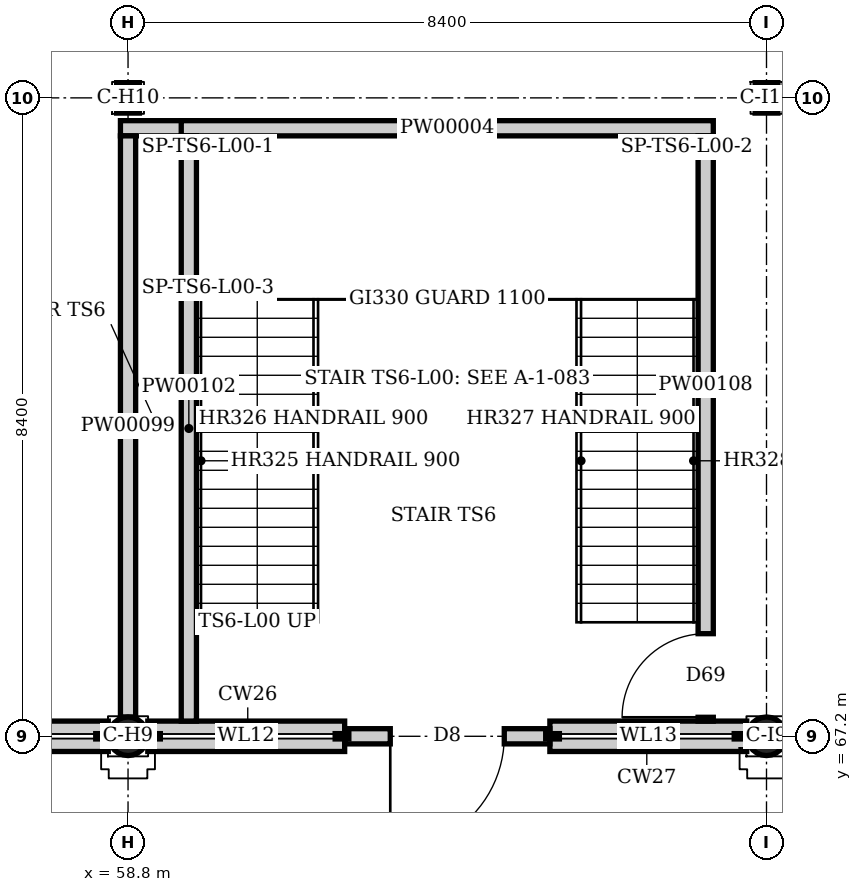
"""IFC4 building model, lengths in metres.
Left out: names, types, materials, properties, quantities, classifications, styles, units other than length and angle.
Written with IfcOpenShell. Run it as: python <this file> out.ifc"""

import sys

from ifc_helpers import new_model, si_unit, direction, frame, frame_2d, origin, origin_2d, place, context, subcontext, project, spatial, rectangle, hollow_circle, i_section, extrude, element, fill, save


model = new_model("IFC4")
c1 = context("Model", 3, precision=1e-05, world=origin(), true_north=direction((0.0, 1.0)))
c2 = subcontext(c1, "Body", "Model", "MODEL_VIEW")
j1 = project(units=[si_unit("LENGTHUNIT", "METRE"), si_unit("PLANEANGLEUNIT", "RADIAN")], contexts=[c1])
p1 = place(None, origin())
s1 = spatial("IfcSite", under=j1, at=p1, CompositionType="ELEMENT")
p2 = place(p1, origin())
s2 = spatial("IfcBuilding", under=s1, at=p2, CompositionType="ELEMENT")
p3 = place(p2, origin())
s3 = spatial("IfcBuildingStorey", under=s2, at=p3, CompositionType="ELEMENT", Elevation=0.0)
for number, where, z_axis, x_axis in (
    (1, (58.8, 67.2, -0.7), (0.0, 0.0, 1.0), (1.0, 0.0, 0.0)),
    (2, (67.2, 67.2, -0.7), (0.0, 0.0, 1.0), (1.0, 0.0, 0.0)),
):
    element("IfcColumn", number, at=place(p3, frame(where, z_axis=z_axis, x_axis=x_axis)), inside=s3, PredefinedType="COLUMN", context=c2, shape_type="SweptSolid", body=[
        extrude(hollow_circle(Radius=0.254, WallThickness=0.016, at=origin_2d()), origin(), (0.0, 0.0, 1.0), 6.7),
    ])
for number, where, z_axis, x_axis in (
    (3, (58.8, 75.6, -0.7), (0.0, 0.0, 1.0), (1.0, 0.0, 0.0)),
    (4, (67.2, 75.6, -0.7), (0.0, 0.0, 1.0), (1.0, 0.0, 0.0)),
):
    element("IfcColumn", number, at=place(p3, frame(where, z_axis=z_axis, x_axis=x_axis)), inside=s3, PredefinedType="COLUMN", context=c2, shape_type="SweptSolid", body=[
        extrude(i_section(OverallWidth=0.3, OverallDepth=0.4, WebThickness=0.013, FlangeThickness=0.024, at=origin_2d()), origin(), (0.0, 0.0, 1.0), 6.7),
    ])
p4 = place(p3, frame((50.66, 67.2, 0.0), z_axis=(0.0, 0.0, 1.0), x_axis=(1.0, 0.0, 0.0)))
e5 = element("IfcWall", 5, at=p4, inside=s3, PredefinedType="SOLIDWALL", context=c2, shape_type="SweptSolid", body=[
    extrude(rectangle(XDim=7.88, YDim=0.4, at=frame_2d((3.94, 0.0))), origin(), (0.0, 0.0, 1.0), 1.2),
])
for number, where, z_axis, x_axis in (
    (6, (59.06, 67.2, 0.0), (0.0, 0.0, 1.0), (1.0, 0.0, 0.0)),
    (7, (64.35, 67.2, 0.0), (0.0, 0.0, 1.0), (1.0, 0.0, 0.0)),
):
    element("IfcWall", number, at=place(p3, frame(where, z_axis=z_axis, x_axis=x_axis)), inside=s3, PredefinedType="SOLIDWALL", context=c2, shape_type="SweptSolid", body=[
        extrude(rectangle(XDim=2.59, YDim=0.4, at=frame_2d((1.295, 0.0))), origin(), (0.0, 0.0, 1.0), 1.2),
    ])
p5 = place(p3, frame((61.65, 67.2, 0.0), z_axis=(0.0, 0.0, 1.0), x_axis=(1.0, 0.0, 0.0)))
e8 = element("IfcWall", 8, at=p5, inside=s3, PredefinedType="SOLIDWALL", context=c2, shape_type="SweptSolid", body=[
    extrude(rectangle(XDim=2.7, YDim=0.2, at=frame_2d((1.35, 0.0))), origin(), (0.0, 0.0, 1.0), 5.198),
])
p6 = place(p5, frame((0.6, 0.0, 0.0)))
e9 = element("IfcOpeningElement", 9, at=p6, cuts=e8, PredefinedType="OPENING", context=c2, shape_type="SweptSolid", body=[
    extrude(rectangle(XDim=1.5, YDim=2.4, at=frame_2d((0.75, 1.2))), frame((0.0, 0.11, 0.0), z_axis=(0.0, -1.0, 0.0), x_axis=(1.0, 0.0, 0.0)), (0.0, 0.0, 1.0), 0.22),
])
p7 = place(p3, frame((58.7, 75.2, 0.0), z_axis=(0.0, 0.0, 1.0), x_axis=(1.0, 0.0, 0.0)))
e10 = element("IfcWall", 10, at=p7, inside=s3, PredefinedType="PARTITIONING", context=c2, shape_type="SweptSolid", body=[
    extrude(rectangle(XDim=1.0, YDim=0.2, at=frame_2d((0.5, 0.0))), origin(), (0.0, 0.0, 1.0), 5.8),
])
p8 = place(p3, frame((59.5, 75.2, 0.0), z_axis=(0.0, 0.0, 1.0), x_axis=(1.0, 0.0, 0.0)))
e11 = element("IfcWall", 11, at=p8, inside=s3, PredefinedType="PARTITIONING", context=c2, shape_type="SweptSolid", body=[
    extrude(rectangle(XDim=7.0, YDim=0.2, at=frame_2d((3.5, 0.0))), origin(), (0.0, 0.0, 1.0), 5.8),
])
p9 = place(p3, frame((58.8, 67.454, 0.0), z_axis=(0.0, 0.0, 1.0), x_axis=(0.0, 1.0, 0.0)))
e12 = element("IfcWall", 12, at=p9, inside=s3, PredefinedType="PARTITIONING", context=c2, shape_type="SweptSolid", body=[
    extrude(rectangle(XDim=7.646, YDim=0.2, at=frame_2d((3.823, 0.0))), origin(), (0.0, 0.0, 1.0), 5.198),
])
p10 = place(p3, frame((59.6, 67.4, 0.0), z_axis=(0.0, 0.0, 1.0), x_axis=(0.0, 1.0, 0.0)))
e13 = element("IfcWall", 13, at=p10, inside=s3, PredefinedType="PARTITIONING", context=c2, shape_type="SweptSolid", body=[
    extrude(rectangle(XDim=7.7, YDim=0.2, at=frame_2d((3.85, 0.0))), origin(), (0.0, 0.0, 1.0), 5.8),
])
p11 = place(p3, frame((66.4, 67.4, 0.0), z_axis=(0.0, 0.0, 1.0), x_axis=(0.0, 1.0, 0.0)))
e14 = element("IfcWall", 14, at=p11, inside=s3, PredefinedType="PARTITIONING", context=c2, shape_type="SweptSolid", body=[
    extrude(rectangle(XDim=7.7, YDim=0.2, at=frame_2d((3.85, 0.0))), origin(), (0.0, 0.0, 1.0), 5.8),
])
p12 = place(p11, frame((0.05, 0.0, 0.0)))
e15 = element("IfcOpeningElement", 15, at=p12, cuts=e14, PredefinedType="OPENING", context=c2, shape_type="SweptSolid", body=[
    extrude(rectangle(XDim=1.1, YDim=2.4, at=frame_2d((0.55, 1.2))), frame((0.0, 0.11, 0.0), z_axis=(0.0, -1.0, 0.0), x_axis=(1.0, 0.0, 0.0)), (0.0, 0.0, 1.0), 0.22),
])
for number, where, z_axis, x_axis in (
    (16, (59.85, 74.95, 0.0), (0.0, 0.0, 1.0), (1.0, 0.0, 0.0)),
    (17, (66.15, 74.95, 0.0), (0.0, 0.0, 1.0), (1.0, 0.0, 0.0)),
    (18, (59.85, 73.1, 0.0), (0.0, 0.0, 1.0), (1.0, 0.0, 0.0)),
):
    element("IfcColumn", number, at=place(p3, frame(where, z_axis=z_axis, x_axis=x_axis)), inside=s3, PredefinedType="COLUMN", context=c2, shape_type="SweptSolid", body=[
        extrude(hollow_circle(Radius=0.07, WallThickness=0.008, at=origin_2d()), origin(), (0.0, 0.0, 1.0), 2.8),
    ])
p13 = place(p6, frame((1.5, 0.0, 0.0), z_axis=(0.0, 0.0, 1.0), x_axis=(-1.0, 0.0, 0.0)))
e19 = element("IfcDoor", 19, at=p13, inside=s3, OperationType="SINGLE_SWING_RIGHT", PredefinedType="DOOR", context=c2, shape_type="SweptSolid", body=[
    extrude(rectangle(XDim=1.5, YDim=2.4, at=frame_2d((0.75, 1.2))), frame((0.0, 0.025, 0.0), z_axis=(0.0, -1.0, 0.0), x_axis=(1.0, 0.0, 0.0)), (0.0, 0.0, 1.0), 0.05),
])
fill(e9, e19)
p14 = place(p12, origin())
e20 = element("IfcDoor", 20, at=p14, inside=s3, OperationType="SINGLE_SWING_LEFT", PredefinedType="DOOR", context=c2, shape_type="SweptSolid", body=[
    extrude(rectangle(XDim=1.1, YDim=2.4, at=frame_2d((0.55, 1.2))), frame((0.0, 0.025, 0.0), z_axis=(0.0, -1.0, 0.0), x_axis=(1.0, 0.0, 0.0)), (0.0, 0.0, 1.0), 0.05),
])
fill(e15, e20)
save(model, sys.argv[1])
